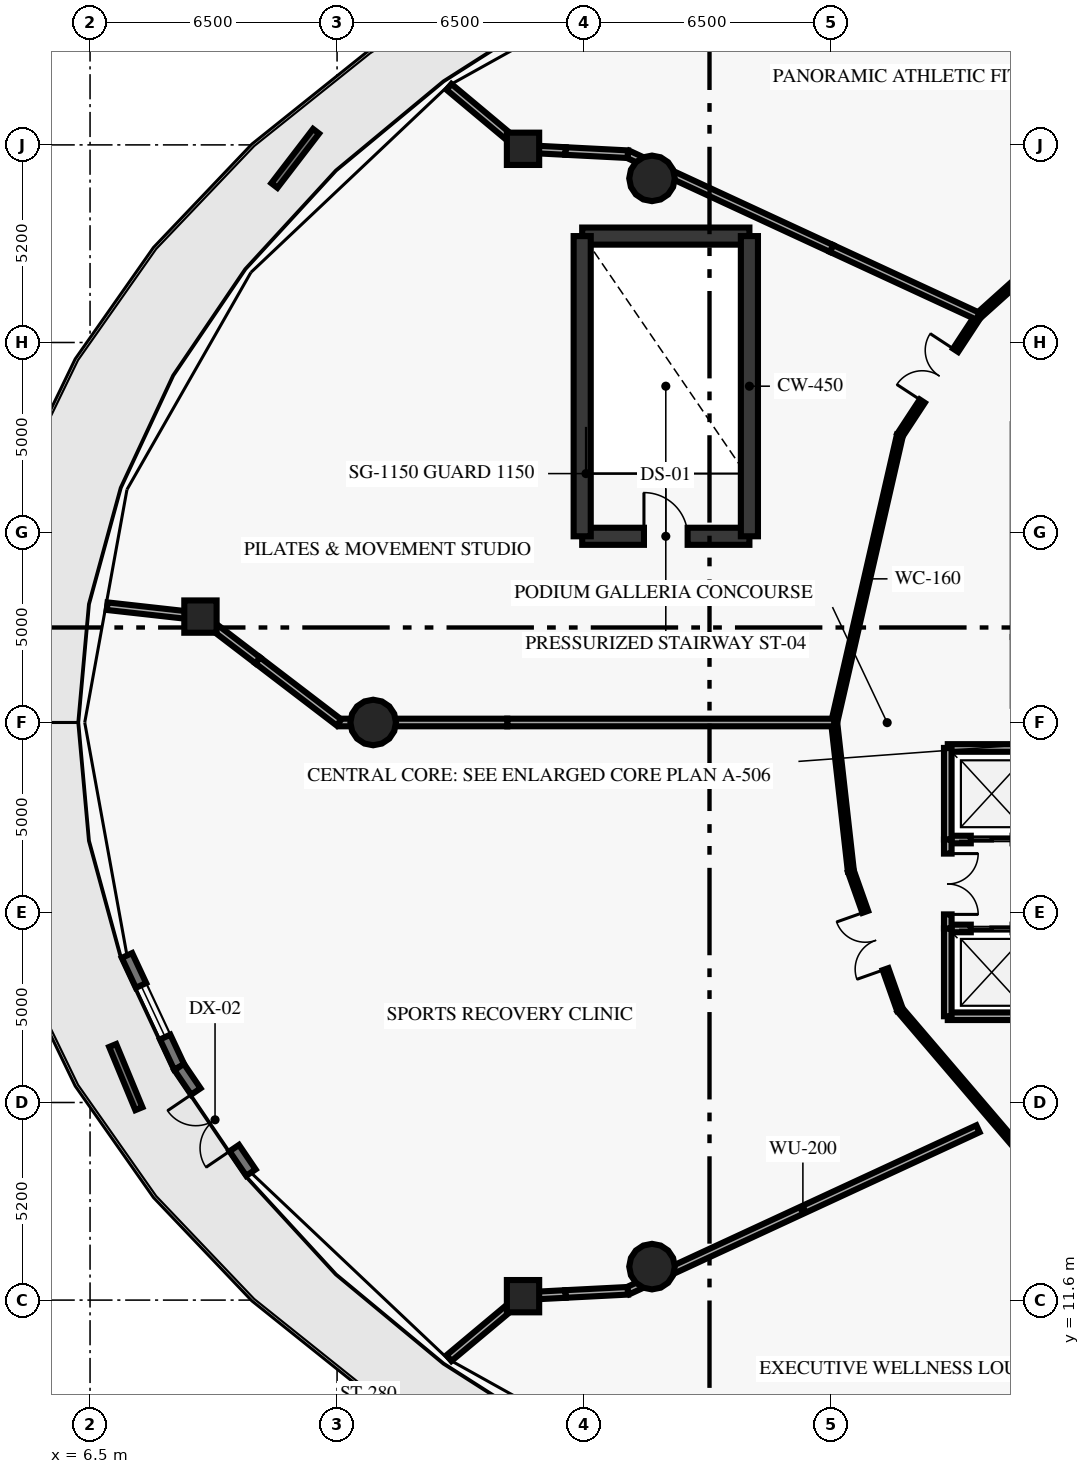
"""IFC4 building model, lengths in metres.
Left out: names, types, materials, properties, quantities, classifications, styles, units other than length and angle.
Written with IfcOpenShell. Run it as: python <this file> out.ifc"""

import sys

from ifc_helpers import new_model, si_unit, direction, frame, frame_2d, origin, origin_2d, place, context, subcontext, project, spatial, rectangle, circle, extrude, element, fill, save


model = new_model("IFC4")
c1 = context("Model", 3, precision=1e-05, world=origin(), true_north=direction((0.0, 1.0)))
c2 = subcontext(c1, "Body", "Model", "MODEL_VIEW")
j1 = project(units=[si_unit("LENGTHUNIT", "METRE"), si_unit("PLANEANGLEUNIT", "RADIAN")], contexts=[c1])
p1 = place(None, origin())
s1 = spatial("IfcSite", under=j1, at=p1, CompositionType="ELEMENT")
p2 = place(p1, origin())
s2 = spatial("IfcBuilding", under=s1, at=p2, CompositionType="ELEMENT")
p3 = place(p2, frame((0.0, 0.0, 16.0)))
s3 = spatial("IfcBuildingStorey", under=s2, at=p3, CompositionType="ELEMENT", Elevation=16.0)
for number, where, z_axis, x_axis in (
    (1, (21.287, 41.119, 0.0), (0.0, 0.0, 1.0), (1.0, 0.0, 0.0)),
    (2, (13.95, 26.8, 0.0), (0.0, 0.0, 1.0), (1.0, 0.0, 0.0)),
    (3, (21.287, 12.481, 0.0), (0.0, 0.0, 1.0), (1.0, 0.0, 0.0)),
):
    element("IfcColumn", number, at=place(p3, frame(where, z_axis=z_axis, x_axis=x_axis)), inside=s3, PredefinedType="COLUMN", context=c2, shape_type="SweptSolid", body=[
        extrude(circle(Radius=0.6, at=origin_2d()), origin(), (0.0, 0.0, 1.0), 4.74),
    ])
for number, where, z_axis, x_axis in (
    (4, (17.893, 41.897, 0.0), (0.0, 0.0, 1.0), (1.0, 0.0, 0.0)),
    (5, (9.405, 29.587, 0.0), (0.0, 0.0, 1.0), (1.0, 0.0, 0.0)),
    (6, (17.893, 11.703, 0.0), (0.0, 0.0, 1.0), (1.0, 0.0, 0.0)),
):
    element("IfcColumn", number, at=place(p3, frame(where, z_axis=z_axis, x_axis=x_axis)), inside=s3, PredefinedType="COLUMN", context=c2, shape_type="SweptSolid", body=[
        extrude(rectangle(XDim=0.85, YDim=0.85, at=origin_2d()), origin(), (0.0, 0.0, 1.0), 4.74),
    ])
p4 = place(p3, frame((8.845, 17.734, 0.0), z_axis=(0.0, 0.0, 1.0), x_axis=(-0.423734962383, 0.905786222932, 0.0)))
e7 = element("IfcWall", 7, at=p4, inside=s3, PredefinedType="STANDARD", context=c2, shape_type="SweptSolid", body=[
    extrude(rectangle(XDim=3.24, YDim=0.3, at=frame_2d((1.62, 0.0))), origin(), (0.0, 0.0, 1.0), 4.74),
])
p5 = place(p4, frame((0.87, 0.0, 0.9)))
e8 = element("IfcOpeningElement", 8, at=p5, cuts=e7, PredefinedType="OPENING", context=c2, shape_type="SweptSolid", body=[
    extrude(rectangle(XDim=1.5, YDim=2.2, at=frame_2d((0.75, 1.1))), frame((0.0, 0.16, 0.0), z_axis=(0.0, -1.0, 0.0), x_axis=(1.0, 0.0, 0.0)), (0.0, 0.0, 1.0), 0.32),
])
p6 = place(p3, frame((10.733, 14.955, 0.0), z_axis=(0.0, 0.0, 1.0), x_axis=(-0.561974045027, 0.827154866223, 0.0)))
e9 = element("IfcWall", 9, at=p6, inside=s3, PredefinedType="STANDARD", context=c2, shape_type="SweptSolid", body=[
    extrude(rectangle(XDim=3.359, YDim=0.3, at=frame_2d((1.68, 0.0))), origin(), (0.0, 0.0, 1.0), 4.74),
])
p7 = place(p6, frame((0.78, 0.0, 0.0)))
e10 = element("IfcOpeningElement", 10, at=p7, cuts=e9, PredefinedType="OPENING", context=c2, shape_type="SweptSolid", body=[
    extrude(rectangle(XDim=1.8, YDim=2.25, at=frame_2d((0.9, 1.125))), frame((0.0, 0.16, 0.0), z_axis=(0.0, -1.0, 0.0), x_axis=(1.0, 0.0, 0.0)), (0.0, 0.0, 1.0), 0.32),
])
for number, where, z_axis, x_axis in (
    (11, (11.351, 40.931, 0.0), (0.0, 0.0, 1.0), (0.609, 0.793, 0.0)),
    (12, (7.785, 16.637, 0.0), (0.0, 0.0, 1.0), (-0.383, 0.924, 0.0)),
):
    element("IfcWall", number, at=place(p3, frame(where, z_axis=z_axis, x_axis=x_axis)), inside=s3, PredefinedType="ELEMENTEDWALL", context=c2, shape_type="SweptSolid", body=[
        extrude(rectangle(XDim=1.8, YDim=0.2, at=frame_2d((0.9, 0.0))), origin(), (0.0, 0.0, 1.0), 0.65),
    ])
p8 = place(p3, frame((19.45, 31.7, 0.0), z_axis=(0.0, 0.0, 1.0), x_axis=(1.0, 0.0, 0.0)))
e13 = element("IfcWall", 13, at=p8, inside=s3, PredefinedType="SHEAR", context=c2, shape_type="SweptSolid", body=[
    extrude(rectangle(XDim=4.4, YDim=0.45, at=frame_2d((2.2, 0.0))), origin(), (0.0, 0.0, 1.0), 4.74),
])
p9 = place(p8, frame((1.625, 0.0, 0.0)))
e14 = element("IfcOpeningElement", 14, at=p9, cuts=e13, PredefinedType="OPENING", context=c2, shape_type="SweptSolid", body=[
    extrude(rectangle(XDim=1.15, YDim=2.15, at=frame_2d((0.575, 1.075))), frame((0.0, 0.235, 0.0), z_axis=(0.0, -1.0, 0.0), x_axis=(1.0, 0.0, 0.0)), (0.0, 0.0, 1.0), 0.47),
])
p10 = place(p3, frame((19.45, 39.6, 0.0), z_axis=(0.0, 0.0, 1.0), x_axis=(1.0, 0.0, 0.0)))
e15 = element("IfcWall", 15, at=p10, inside=s3, PredefinedType="SHEAR", context=c2, shape_type="SweptSolid", body=[
    extrude(rectangle(XDim=4.4, YDim=0.45, at=frame_2d((2.2, 0.0))), origin(), (0.0, 0.0, 1.0), 4.74),
])
for number, where, z_axis, x_axis in (
    (16, (19.45, 31.7, 0.0), (0.0, 0.0, 1.0), (0.0, 1.0, 0.0)),
    (17, (23.85, 31.7, 0.0), (0.0, 0.0, 1.0), (0.0, 1.0, 0.0)),
):
    element("IfcWall", number, at=place(p3, frame(where, z_axis=z_axis, x_axis=x_axis)), inside=s3, PredefinedType="SHEAR", context=c2, shape_type="SweptSolid", body=[
        extrude(rectangle(XDim=7.9, YDim=0.45, at=frame_2d((3.95, 0.0))), origin(), (0.0, 0.0, 1.0), 4.74),
    ])
p11 = place(p3, frame((29.07, 23.72, 0.0), z_axis=(0.0, 0.0, 1.0), x_axis=(1.0, 0.0, 0.0)))
e18 = element("IfcWall", 18, at=p11, inside=s3, PredefinedType="SOLIDWALL", context=c2, shape_type="SweptSolid", body=[
    extrude(rectangle(XDim=2.31, YDim=0.2, at=frame_2d((1.155, 0.0))), origin(), (0.0, 0.0, 1.0), 4.74),
])
p12 = place(p11, frame((0.605, 0.0, 0.0)))
e19 = element("IfcOpeningElement", 19, at=p12, cuts=e18, PredefinedType="OPENING", context=c2, shape_type="SweptSolid", body=[
    extrude(rectangle(XDim=1.1, YDim=2.15, at=frame_2d((0.55, 1.075))), frame((0.0, 0.11, 0.0), z_axis=(0.0, -1.0, 0.0), x_axis=(1.0, 0.0, 0.0)), (0.0, 0.0, 1.0), 0.22),
])
p13 = place(p3, frame((29.07, 26.13, 0.0), z_axis=(0.0, 0.0, 1.0), x_axis=(1.0, 0.0, 0.0)))
e20 = element("IfcWall", 20, at=p13, inside=s3, PredefinedType="SOLIDWALL", context=c2, shape_type="SweptSolid", body=[
    extrude(rectangle(XDim=2.31, YDim=0.2, at=frame_2d((1.155, 0.0))), origin(), (0.0, 0.0, 1.0), 4.74),
])
p14 = place(p3, frame((29.07, 23.72, 0.0), z_axis=(0.0, 0.0, 1.0), x_axis=(0.0, 1.0, 0.0)))
e21 = element("IfcWall", 21, at=p14, inside=s3, PredefinedType="SOLIDWALL", context=c2, shape_type="SweptSolid", body=[
    extrude(rectangle(XDim=2.41, YDim=0.2, at=frame_2d((1.205, 0.0))), origin(), (0.0, 0.0, 1.0), 4.74),
])
p15 = place(p3, frame((29.07, 19.07, 0.0), z_axis=(0.0, 0.0, 1.0), x_axis=(1.0, 0.0, 0.0)))
e22 = element("IfcWall", 22, at=p15, inside=s3, PredefinedType="SOLIDWALL", context=c2, shape_type="SweptSolid", body=[
    extrude(rectangle(XDim=2.31, YDim=0.2, at=frame_2d((1.155, 0.0))), origin(), (0.0, 0.0, 1.0), 4.74),
])
p16 = place(p3, frame((29.07, 21.38, 0.0), z_axis=(0.0, 0.0, 1.0), x_axis=(1.0, 0.0, 0.0)))
e23 = element("IfcWall", 23, at=p16, inside=s3, PredefinedType="SOLIDWALL", context=c2, shape_type="SweptSolid", body=[
    extrude(rectangle(XDim=2.31, YDim=0.2, at=frame_2d((1.155, 0.0))), origin(), (0.0, 0.0, 1.0), 4.74),
])
p17 = place(p16, frame((0.605, 0.0, 0.0)))
e24 = element("IfcOpeningElement", 24, at=p17, cuts=e23, PredefinedType="OPENING", context=c2, shape_type="SweptSolid", body=[
    extrude(rectangle(XDim=1.1, YDim=2.15, at=frame_2d((0.55, 1.075))), frame((0.0, 0.11, 0.0), z_axis=(0.0, -1.0, 0.0), x_axis=(1.0, 0.0, 0.0)), (0.0, 0.0, 1.0), 0.22),
])
p18 = place(p3, frame((29.07, 19.07, 0.0), z_axis=(0.0, 0.0, 1.0), x_axis=(0.0, 1.0, 0.0)))
e25 = element("IfcWall", 25, at=p18, inside=s3, PredefinedType="SOLIDWALL", context=c2, shape_type="SweptSolid", body=[
    extrude(rectangle(XDim=2.31, YDim=0.2, at=frame_2d((1.155, 0.0))), origin(), (0.0, 0.0, 1.0), 4.74),
])
p19 = place(p3, frame((29.07, 21.38, 0.0), z_axis=(0.0, 0.0, 1.0), x_axis=(0.0, 1.0, 0.0)))
e26 = element("IfcWall", 26, at=p19, inside=s3, PredefinedType="SOLIDWALL", context=c2, shape_type="SweptSolid", body=[
    extrude(rectangle(XDim=2.34, YDim=0.2, at=frame_2d((1.17, 0.0))), origin(), (0.0, 0.0, 1.0), 4.74),
])
p20 = place(p19, frame((0.37, 0.0, 0.0)))
e27 = element("IfcOpeningElement", 27, at=p20, cuts=e26, PredefinedType="OPENING", context=c2, shape_type="SweptSolid", body=[
    extrude(rectangle(XDim=1.6, YDim=2.2, at=frame_2d((0.8, 1.1))), frame((0.0, 0.11, 0.0), z_axis=(0.0, -1.0, 0.0), x_axis=(1.0, 0.0, 0.0)), (0.0, 0.0, 1.0), 0.22),
])
p21 = place(p3, frame((32.54, 39.894, 0.0), z_axis=(0.0, 0.0, 1.0), x_axis=(-0.744032872127, -0.668143012531, 0.0)))
e28 = element("IfcWall", 28, at=p21, inside=s3, PredefinedType="PARTITIONING", context=c2, shape_type="SweptSolid", body=[
    extrude(rectangle(XDim=3.597, YDim=0.16, at=frame_2d((1.798, 0.0))), origin(), (0.0, 0.0, 1.0), 4.74),
])
p22 = place(p3, frame((27.811, 34.36, 0.0), z_axis=(0.0, 0.0, 1.0), x_axis=(0.548348738977, 0.836249759619, 0.0)))
e29 = element("IfcWall", 29, at=p22, inside=s3, PredefinedType="PARTITIONING", context=c2, shape_type="SweptSolid", body=[
    extrude(rectangle(XDim=3.744, YDim=0.16, at=frame_2d((1.872, 0.0))), origin(), (0.0, 0.0, 1.0), 4.74),
])
p23 = place(p22, frame((1.072, 0.0, 0.0)))
e30 = element("IfcOpeningElement", 30, at=p23, cuts=e29, PredefinedType="OPENING", context=c2, shape_type="SweptSolid", body=[
    extrude(rectangle(XDim=1.6, YDim=2.2, at=frame_2d((0.8, 1.1))), frame((0.0, 0.09, 0.0), z_axis=(0.0, -1.0, 0.0), x_axis=(1.0, 0.0, 0.0)), (0.0, 0.0, 1.0), 0.18),
])
p24 = place(p3, frame((27.811, 34.36, 0.0), z_axis=(0.0, 0.0, 1.0), x_axis=(-0.223185487206, -0.974775993909, 0.0)))
e31 = element("IfcWall", 31, at=p24, inside=s3, PredefinedType="PARTITIONING", context=c2, shape_type="SweptSolid", body=[
    extrude(rectangle(XDim=7.756, YDim=0.16, at=frame_2d((3.878, 0.0))), origin(), (0.0, 0.0, 1.0), 4.74),
])
p25 = place(p3, frame((26.08, 26.8, 0.0), z_axis=(0.0, 0.0, 1.0), x_axis=(0.111724363671, -0.99373923469, 0.0)))
e32 = element("IfcWall", 32, at=p25, inside=s3, PredefinedType="PARTITIONING", context=c2, shape_type="SweptSolid", body=[
    extrude(rectangle(XDim=3.938, YDim=0.16, at=frame_2d((1.969, 0.0))), origin(), (0.0, 0.0, 1.0), 4.74),
])
p26 = place(p3, frame((27.811, 19.24, 0.0), z_axis=(0.0, 0.0, 1.0), x_axis=(-0.333704620558, 0.942677689467, 0.0)))
e33 = element("IfcWall", 33, at=p26, inside=s3, PredefinedType="PARTITIONING", context=c2, shape_type="SweptSolid", body=[
    extrude(rectangle(XDim=3.869, YDim=0.16, at=frame_2d((1.934, 0.0))), origin(), (0.0, 0.0, 1.0), 4.74),
])
p27 = place(p26, frame((1.134, 0.0, 0.0)))
e34 = element("IfcOpeningElement", 34, at=p27, cuts=e33, PredefinedType="OPENING", context=c2, shape_type="SweptSolid", body=[
    extrude(rectangle(XDim=1.6, YDim=2.2, at=frame_2d((0.8, 1.1))), frame((0.0, 0.09, 0.0), z_axis=(0.0, -1.0, 0.0), x_axis=(1.0, 0.0, 0.0)), (0.0, 0.0, 1.0), 0.18),
])
p28 = place(p3, frame((27.811, 19.24, 0.0), z_axis=(0.0, 0.0, 1.0), x_axis=(0.649652680018, -0.760231145998, 0.0)))
e35 = element("IfcWall", 35, at=p28, inside=s3, PredefinedType="PARTITIONING", context=c2, shape_type="SweptSolid", body=[
    extrude(rectangle(XDim=7.279, YDim=0.16, at=frame_2d((3.64, 0.0))), origin(), (0.0, 0.0, 1.0), 4.74),
])
p29 = place(p3, frame((29.864, 37.491, 0.0), z_axis=(0.0, 0.0, 1.0), x_axis=(-0.907543218971, 0.419958695231, 0.0)))
e36 = element("IfcWall", 36, at=p29, inside=s3, PredefinedType="PARTITIONING", context=c2, shape_type="SweptSolid", body=[
    extrude(rectangle(XDim=4.246, YDim=0.2, at=frame_2d((2.123, 0.0))), origin(), (0.0, 0.0, 1.0), 4.74),
])
p30 = place(p3, frame((26.011, 39.274, 0.0), z_axis=(0.0, 0.0, 1.0), x_axis=(-0.907468259345, 0.420120647293, 0.0)))
e37 = element("IfcWall", 37, at=p30, inside=s3, PredefinedType="PARTITIONING", context=c2, shape_type="SweptSolid", body=[
    extrude(rectangle(XDim=5.099, YDim=0.2, at=frame_2d((2.549, 0.0))), origin(), (0.0, 0.0, 1.0), 2.94),
])
p31 = place(p3, frame((21.384, 41.416, 0.0), z_axis=(0.0, 0.0, 1.0), x_axis=(-0.907729224474, 0.419556498025, 0.0)))
e38 = element("IfcWall", 38, at=p31, inside=s3, PredefinedType="PARTITIONING", context=c2, shape_type="SweptSolid", body=[
    extrude(rectangle(XDim=0.808, YDim=0.2, at=frame_2d((0.404, 0.0))), origin(), (0.0, 0.0, 1.0), 4.74),
])
p32 = place(p3, frame((20.651, 41.755, 0.0), z_axis=(0.0, 0.0, 1.0), x_axis=(-0.998685128887, 0.051264152576, 0.0)))
e39 = element("IfcWall", 39, at=p32, inside=s3, PredefinedType="PARTITIONING", context=c2, shape_type="SweptSolid", body=[
    extrude(rectangle(XDim=1.643, YDim=0.2, at=frame_2d((0.822, 0.0))), origin(), (0.0, 0.0, 1.0), 4.74),
])
p33 = place(p3, frame((19.01, 41.839, 0.0), z_axis=(0.0, 0.0, 1.0), x_axis=(-0.998660904733, 0.051733909163, 0.0)))
e40 = element("IfcWall", 40, at=p33, inside=s3, PredefinedType="PARTITIONING", context=c2, shape_type="SweptSolid", body=[
    extrude(rectangle(XDim=1.118, YDim=0.2, at=frame_2d((0.559, 0.0))), origin(), (0.0, 0.0, 1.0), 4.28),
])
p34 = place(p3, frame((17.893, 41.897, 0.0), z_axis=(0.0, 0.0, 1.0), x_axis=(-0.766903980595, 0.641761859686, 0.0)))
e41 = element("IfcWall", 41, at=p34, inside=s3, PredefinedType="PARTITIONING", context=c2, shape_type="SweptSolid", body=[
    extrude(rectangle(XDim=2.54, YDim=0.2, at=frame_2d((1.27, 0.0))), origin(), (0.0, 0.0, 1.0), 4.74),
])
p35 = place(p3, frame((26.08, 26.8, 0.0), z_axis=(0.0, 0.0, 1.0), x_axis=(-1.0, 0.0, 0.0)))
e42 = element("IfcWall", 42, at=p35, inside=s3, PredefinedType="PARTITIONING", context=c2, shape_type="SweptSolid", body=[
    extrude(rectangle(XDim=8.602, YDim=0.2, at=frame_2d((4.301, 0.0))), origin(), (0.0, 0.0, 1.0), 4.74),
])
p36 = place(p3, frame((17.478, 26.8, 0.0), z_axis=(0.0, 0.0, 1.0), x_axis=(-1.0, 0.0, 0.0)))
e43 = element("IfcWall", 43, at=p36, inside=s3, PredefinedType="PARTITIONING", context=c2, shape_type="SweptSolid", body=[
    extrude(rectangle(XDim=3.539, YDim=0.2, at=frame_2d((1.77, 0.0))), origin(), (0.0, 0.0, 1.0), 2.74),
])
p37 = place(p3, frame((13.939, 26.8, 0.0), z_axis=(0.0, 0.0, 1.0), x_axis=(-1.0, 0.0, 0.0)))
e44 = element("IfcWall", 44, at=p37, inside=s3, PredefinedType="PARTITIONING", context=c2, shape_type="SweptSolid", body=[
    extrude(rectangle(XDim=0.889, YDim=0.2, at=frame_2d((0.444, 0.0))), origin(), (0.0, 0.0, 1.0), 4.74),
])
p38 = place(p3, frame((13.05, 26.8, 0.0), z_axis=(0.0, 0.0, 1.0), x_axis=(-0.794337234882, 0.607477042595, 0.0)))
e45 = element("IfcWall", 45, at=p38, inside=s3, PredefinedType="PARTITIONING", context=c2, shape_type="SweptSolid", body=[
    extrude(rectangle(XDim=2.691, YDim=0.2, at=frame_2d((1.346, 0.0))), origin(), (0.0, 0.0, 1.0), 4.74),
])
p39 = place(p3, frame((10.912, 28.435, 0.0), z_axis=(0.0, 0.0, 1.0), x_axis=(-0.794514897702, 0.607244660191, 0.0)))
e46 = element("IfcWall", 46, at=p39, inside=s3, PredefinedType="PARTITIONING", context=c2, shape_type="SweptSolid", body=[
    extrude(rectangle(XDim=1.897, YDim=0.2, at=frame_2d((0.948, 0.0))), origin(), (0.0, 0.0, 1.0), 4.28),
])
p40 = place(p3, frame((9.405, 29.587, 0.0), z_axis=(0.0, 0.0, 1.0), x_axis=(-0.993822114043, 0.110984709036, 0.0)))
e47 = element("IfcWall", 47, at=p40, inside=s3, PredefinedType="PARTITIONING", context=c2, shape_type="SweptSolid", body=[
    extrude(rectangle(XDim=2.47, YDim=0.2, at=frame_2d((1.235, 0.0))), origin(), (0.0, 0.0, 1.0), 4.74),
])
p41 = place(p3, frame((29.864, 16.109, 0.0), z_axis=(0.0, 0.0, 1.0), x_axis=(-0.907520382507, -0.420008041988, 0.0)))
e48 = element("IfcWall", 48, at=p41, inside=s3, PredefinedType="PARTITIONING", context=c2, shape_type="SweptSolid", body=[
    extrude(rectangle(XDim=10.152, YDim=0.2, at=frame_2d((5.076, 0.0))), origin(), (0.0, 0.0, 1.0), 4.74),
])
p42 = place(p3, frame((20.651, 11.845, 0.0), z_axis=(0.0, 0.0, 1.0), x_axis=(-0.998692725363, -0.051115949639, 0.0)))
e49 = element("IfcWall", 49, at=p42, inside=s3, PredefinedType="PARTITIONING", context=c2, shape_type="SweptSolid", body=[
    extrude(rectangle(XDim=1.643, YDim=0.2, at=frame_2d((0.822, 0.0))), origin(), (0.0, 0.0, 1.0), 4.74),
])
p43 = place(p3, frame((19.01, 11.761, 0.0), z_axis=(0.0, 0.0, 1.0), x_axis=(-0.998649603439, -0.051951607785, 0.0)))
e50 = element("IfcWall", 50, at=p43, inside=s3, PredefinedType="PARTITIONING", context=c2, shape_type="SweptSolid", body=[
    extrude(rectangle(XDim=1.118, YDim=0.2, at=frame_2d((0.559, 0.0))), origin(), (0.0, 0.0, 1.0), 4.28),
])
p44 = place(p3, frame((17.893, 11.703, 0.0), z_axis=(0.0, 0.0, 1.0), x_axis=(-0.76695128647, -0.641705325038, 0.0)))
e51 = element("IfcWall", 51, at=p44, inside=s3, PredefinedType="PARTITIONING", context=c2, shape_type="SweptSolid", body=[
    extrude(rectangle(XDim=2.54, YDim=0.2, at=frame_2d((1.27, 0.0))), origin(), (0.0, 0.0, 1.0), 4.74),
])
p45 = place(p5, origin())
e52 = element("IfcWindow", 52, at=p45, inside=s3, PartitioningType="DOUBLE_PANEL_VERTICAL", PredefinedType="WINDOW", context=c2, shape_type="SweptSolid", body=[
    extrude(rectangle(XDim=1.5, YDim=2.2, at=frame_2d((0.75, 1.1))), frame((0.0, 0.03, 0.0), z_axis=(0.0, -1.0, 0.0), x_axis=(1.0, 0.0, 0.0)), (0.0, 0.0, 1.0), 0.06),
])
fill(e8, e52)
p46 = place(p7, origin())
e53 = element("IfcDoor", 53, at=p46, inside=s3, OperationType="DOUBLE_DOOR_SINGLE_SWING", PredefinedType="DOOR", context=c2, shape_type="SweptSolid", body=[
    extrude(rectangle(XDim=1.8, YDim=2.25, at=frame_2d((0.9, 1.125))), frame((0.0, 0.025, 0.0), z_axis=(0.0, -1.0, 0.0), x_axis=(1.0, 0.0, 0.0)), (0.0, 0.0, 1.0), 0.05),
])
fill(e10, e53)
p47 = place(p9, origin())
e54 = element("IfcDoor", 54, at=p47, inside=s3, OperationType="SINGLE_SWING_LEFT", PredefinedType="DOOR", context=c2, shape_type="SweptSolid", body=[
    extrude(rectangle(XDim=1.15, YDim=2.15, at=frame_2d((0.575, 1.075))), frame((0.0, 0.025, 0.0), z_axis=(0.0, -1.0, 0.0), x_axis=(1.0, 0.0, 0.0)), (0.0, 0.0, 1.0), 0.05),
])
fill(e14, e54)
p48 = place(p12, origin())
e55 = element("IfcDoor", 55, at=p48, inside=s3, OperationType="DOUBLE_DOOR_SLIDING", PredefinedType="DOOR", context=c2, shape_type="SweptSolid", body=[
    extrude(rectangle(XDim=1.1, YDim=2.15, at=frame_2d((0.55, 1.075))), frame((0.0, 0.025, 0.0), z_axis=(0.0, -1.0, 0.0), x_axis=(1.0, 0.0, 0.0)), (0.0, 0.0, 1.0), 0.05),
])
fill(e19, e55)
p49 = place(p17, origin())
e56 = element("IfcDoor", 56, at=p49, inside=s3, OperationType="DOUBLE_DOOR_SLIDING", PredefinedType="DOOR", context=c2, shape_type="SweptSolid", body=[
    extrude(rectangle(XDim=1.1, YDim=2.15, at=frame_2d((0.55, 1.075))), frame((0.0, 0.025, 0.0), z_axis=(0.0, -1.0, 0.0), x_axis=(1.0, 0.0, 0.0)), (0.0, 0.0, 1.0), 0.05),
])
fill(e24, e56)
p50 = place(p20, origin())
e57 = element("IfcDoor", 57, at=p50, inside=s3, OperationType="DOUBLE_DOOR_SINGLE_SWING", PredefinedType="DOOR", context=c2, shape_type="SweptSolid", body=[
    extrude(rectangle(XDim=1.6, YDim=2.2, at=frame_2d((0.8, 1.1))), frame((0.0, 0.025, 0.0), z_axis=(0.0, -1.0, 0.0), x_axis=(1.0, 0.0, 0.0)), (0.0, 0.0, 1.0), 0.05),
])
fill(e27, e57)
p51 = place(p23, origin())
e58 = element("IfcDoor", 58, at=p51, inside=s3, OperationType="DOUBLE_DOOR_SINGLE_SWING", PredefinedType="DOOR", context=c2, shape_type="SweptSolid", body=[
    extrude(rectangle(XDim=1.6, YDim=2.2, at=frame_2d((0.8, 1.1))), frame((0.0, 0.025, 0.0), z_axis=(0.0, -1.0, 0.0), x_axis=(1.0, 0.0, 0.0)), (0.0, 0.0, 1.0), 0.05),
])
fill(e30, e58)
p52 = place(p27, origin())
e59 = element("IfcDoor", 59, at=p52, inside=s3, OperationType="DOUBLE_DOOR_SINGLE_SWING", PredefinedType="DOOR", context=c2, shape_type="SweptSolid", body=[
    extrude(rectangle(XDim=1.6, YDim=2.2, at=frame_2d((0.8, 1.1))), frame((0.0, 0.025, 0.0), z_axis=(0.0, -1.0, 0.0), x_axis=(1.0, 0.0, 0.0)), (0.0, 0.0, 1.0), 0.05),
])
fill(e34, e59)
save(model, sys.argv[1])
